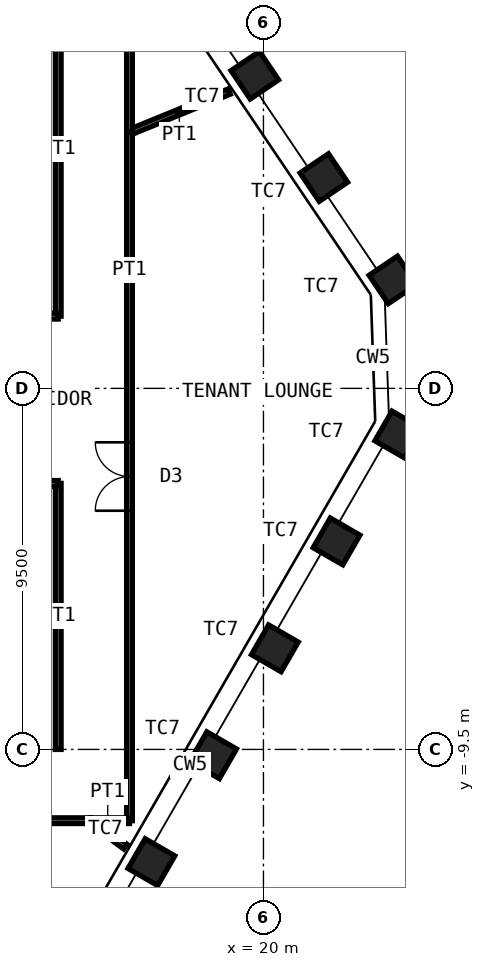
"""IFC4 building model, lengths in metres.
Left out: names, types, materials, properties, quantities, classifications, styles, units other than length and angle.
Written with IfcOpenShell. Run it as: python <this file> out.ifc"""

import sys

from ifc_helpers import new_model, si_unit, direction, frame, frame_2d, origin, origin_2d, place, context, subcontext, project, spatial, rectangle, hollow_rectangle, extrude, element, fill, save


model = new_model("IFC4")
c1 = context("Model", 3, precision=1e-05, world=origin(), true_north=direction((0.0, 1.0)))
c2 = subcontext(c1, "Body", "Model", "MODEL_VIEW")
j1 = project(units=[si_unit("LENGTHUNIT", "METRE"), si_unit("PLANEANGLEUNIT", "RADIAN")], contexts=[c1])
p1 = place(None, origin())
s1 = spatial("IfcSite", under=j1, at=p1, CompositionType="ELEMENT")
p2 = place(p1, origin())
s2 = spatial("IfcBuilding", under=s1, at=p2, CompositionType="ELEMENT")
p3 = place(p2, frame((0.0, 0.0, 287.2)))
s3 = spatial("IfcBuildingStorey", under=s2, at=p3, CompositionType="ELEMENT", Elevation=287.2)
for number, where, z_axis, x_axis in (
    (1, (19.773, 8.239, 0.0), (0.0, 0.0, 1.0), (-0.559, 0.829, 0.0)),
    (2, (21.589, 5.547, 0.0), (0.0, 0.0, 1.0), (-0.559, 0.829, 0.0)),
    (3, (23.406, 2.854, 0.0), (0.0, 0.0, 1.0), (-0.559, 0.829, 0.0)),
    (4, (23.548, -1.214, 0.0), (0.0, 0.0, 1.0), (0.5, 0.866, 0.0)),
    (5, (21.924, -4.027, 0.0), (0.0, 0.0, 1.0), (0.5, 0.866, 0.0)),
    (6, (20.3, -6.84, 0.0), (0.0, 0.0, 1.0), (0.5, 0.866, 0.0)),
    (7, (18.676, -9.653, 0.0), (0.0, 0.0, 1.0), (0.5, 0.866, 0.0)),
    (8, (17.052, -12.466, 0.0), (0.0, 0.0, 1.0), (0.5, 0.866, 0.0)),
):
    element("IfcColumn", number, at=place(p3, frame(where, z_axis=z_axis, x_axis=x_axis)), inside=s3, PredefinedType="COLUMN", context=c2, shape_type="SweptSolid", body=[
        extrude(hollow_rectangle(XDim=0.9, YDim=0.9, WallThickness=0.06, at=origin_2d()), origin(), (0.0, 0.0, 1.0), 4.2),
    ])
p4 = place(p3, frame((19.1, 7.81, 0.0), z_axis=(0.0, 0.0, 1.0), x_axis=(-0.925593572601, -0.378518874509, 0.0)))
e9 = element("IfcWall", 9, at=p4, inside=s3, PredefinedType="PARTITIONING", context=c2, shape_type="SweptSolid", body=[
    extrude(rectangle(XDim=2.836, YDim=0.15, at=frame_2d((1.418, 0.0))), origin(), (0.0, 0.0, 1.0), 3.33),
])
p5 = place(p3, frame((16.475, 6.737, 0.0), z_axis=(0.0, 0.0, 1.0), x_axis=(0.0, -1.0, 0.0)))
e10 = element("IfcWall", 10, at=p5, inside=s3, PredefinedType="PARTITIONING", context=c2, shape_type="SweptSolid", body=[
    extrude(rectangle(XDim=18.112, YDim=0.15, at=frame_2d((9.056, 0.0))), origin(), (0.0, 0.0, 1.0), 4.03),
])
p6 = place(p5, frame((8.156, 0.0, 0.0)))
e11 = element("IfcOpeningElement", 11, at=p6, cuts=e10, PredefinedType="OPENING", context=c2, shape_type="SweptSolid", body=[
    extrude(rectangle(XDim=1.8, YDim=2.4, at=frame_2d((0.9, 1.2))), frame((0.0, 0.085, 0.0), z_axis=(0.0, -1.0, 0.0), x_axis=(1.0, 0.0, 0.0)), (0.0, 0.0, 1.0), 0.17),
])
p7 = place(p3, frame((16.475, -11.375, 0.0), z_axis=(0.0, 0.0, 1.0), x_axis=(-1.0, 0.0, 0.0)))
e12 = element("IfcWall", 12, at=p7, inside=s3, PredefinedType="PARTITIONING", context=c2, shape_type="SweptSolid", body=[
    extrude(rectangle(XDim=1.035, YDim=0.15, at=frame_2d((0.518, 0.0))), origin(), (0.0, 0.0, 1.0), 4.03),
])
p8 = place(p3, frame((16.365, -12.056, 0.0), z_axis=(0.0, 0.0, 1.0), x_axis=(-0.805146625055, 0.593075806421, 0.0)))
e13 = element("IfcWall", 13, at=p8, inside=s3, PredefinedType="PARTITIONING", context=c2, shape_type="SweptSolid", body=[
    extrude(rectangle(XDim=1.149, YDim=0.15, at=frame_2d((0.574, 0.0))), origin(), (0.0, 0.0, 1.0), 3.33),
])
p9 = place(p3, frame((15.44, -11.375, 0.0), z_axis=(0.0, 0.0, 1.0), x_axis=(-1.0, 0.0, 0.0)))
e14 = element("IfcWall", 14, at=p9, inside=s3, PredefinedType="PARTITIONING", context=c2, shape_type="SweptSolid", body=[
    extrude(rectangle(XDim=11.477, YDim=0.15, at=frame_2d((5.739, 0.0))), origin(), (0.0, 0.0, 1.0), 4.03),
])
p10 = place(p9, frame((4.839, 0.0, 0.0)))
e15 = element("IfcOpeningElement", 15, at=p10, cuts=e14, PredefinedType="OPENING", context=c2, shape_type="SweptSolid", body=[
    extrude(rectangle(XDim=1.8, YDim=2.4, at=frame_2d((0.9, 1.2))), frame((0.0, 0.085, 0.0), z_axis=(0.0, -1.0, 0.0), x_axis=(1.0, 0.0, 0.0)), (0.0, 0.0, 1.0), 0.17),
])
p11 = place(p3, frame((16.475, 11.375, 0.0), z_axis=(0.0, 0.0, 1.0), x_axis=(0.0, -1.0, 0.0)))
e16 = element("IfcWall", 16, at=p11, inside=s3, PredefinedType="PARTITIONING", context=c2, shape_type="SweptSolid", body=[
    extrude(rectangle(XDim=4.638, YDim=0.15, at=frame_2d((2.319, 0.0))), origin(), (0.0, 0.0, 1.0), 4.03),
])
p12 = place(p3, frame((14.6, 1.9, 0.0), z_axis=(0.0, 0.0, 1.0), x_axis=(0.0, 1.0, 0.0)))
e17 = element("IfcWall", 17, at=p12, inside=s3, PredefinedType="PARTITIONING", context=c2, shape_type="SweptSolid", body=[
    extrude(rectangle(XDim=7.6, YDim=0.15, at=frame_2d((3.8, 0.0))), origin(), (0.0, 0.0, 1.0), 4.03),
])
p13 = place(p3, frame((12.5, 1.9, 0.0), z_axis=(0.0, 0.0, 1.0), x_axis=(1.0, 0.0, 0.0)))
e18 = element("IfcWall", 18, at=p13, inside=s3, PredefinedType="PARTITIONING", context=c2, shape_type="SweptSolid", body=[
    extrude(rectangle(XDim=2.1, YDim=0.15, at=frame_2d((1.05, 0.0))), origin(), (0.0, 0.0, 1.0), 2.93),
])
p14 = place(p3, frame((14.6, -9.5, 0.0), z_axis=(0.0, 0.0, 1.0), x_axis=(0.0, 1.0, 0.0)))
e19 = element("IfcWall", 19, at=p14, inside=s3, PredefinedType="PARTITIONING", context=c2, shape_type="SweptSolid", body=[
    extrude(rectangle(XDim=7.0, YDim=0.15, at=frame_2d((3.5, 0.0))), origin(), (0.0, 0.0, 1.0), 4.03),
])
p15 = place(p3, frame((12.5, -2.5, 0.0), z_axis=(0.0, 0.0, 1.0), x_axis=(1.0, 0.0, 0.0)))
e20 = element("IfcWall", 20, at=p15, inside=s3, PredefinedType="PARTITIONING", context=c2, shape_type="SweptSolid", body=[
    extrude(rectangle(XDim=2.1, YDim=0.15, at=frame_2d((1.05, 0.0))), origin(), (0.0, 0.0, 1.0), 3.33),
])
p16 = place(p6, origin())
e21 = element("IfcDoor", 21, at=p16, inside=s3, OperationType="DOUBLE_DOOR_DOUBLE_SWING", PredefinedType="DOOR", context=c2, shape_type="SweptSolid", body=[
    extrude(rectangle(XDim=1.8, YDim=2.4, at=frame_2d((0.9, 1.2))), frame((0.0, 0.025, 0.0), z_axis=(0.0, -1.0, 0.0), x_axis=(1.0, 0.0, 0.0)), (0.0, 0.0, 1.0), 0.05),
])
fill(e11, e21)
save(model, sys.argv[1])
